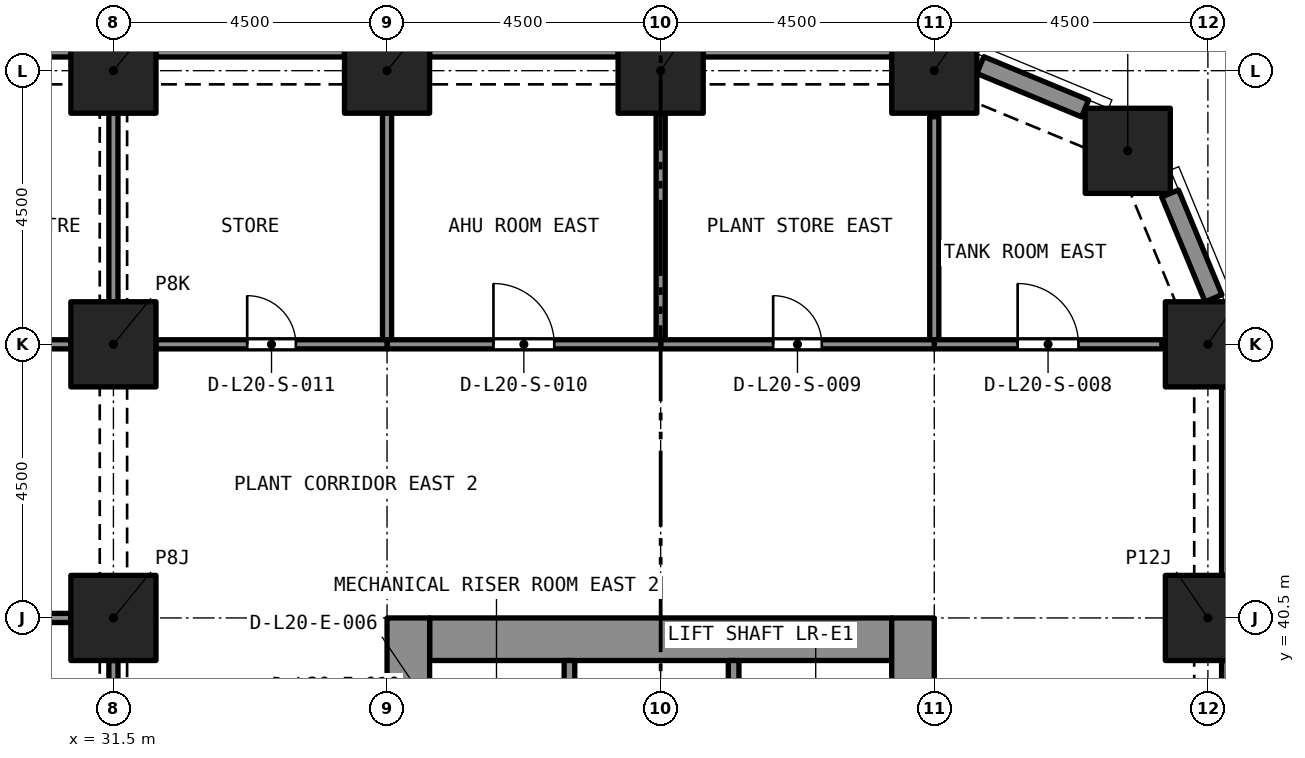
"""IFC4 building model, lengths in metres.
Left out: names, types, materials, properties, quantities, classifications, styles, units other than length and angle.
Written with IfcOpenShell. Run it as: python <this file> out.ifc"""

import sys

from ifc_helpers import new_model, si_unit, direction, frame, frame_2d, origin, origin_2d, place, context, subcontext, project, spatial, rectangle, extrude, element, fill, save


model = new_model("IFC4")
c1 = context("Model", 3, precision=1e-05, world=origin(), true_north=direction((0.0, 1.0)))
c2 = subcontext(c1, "Body", "Model", "MODEL_VIEW")
j1 = project(units=[si_unit("LENGTHUNIT", "METRE"), si_unit("PLANEANGLEUNIT", "RADIAN")], contexts=[c1])
p1 = place(None, origin())
s1 = spatial("IfcSite", under=j1, at=p1, CompositionType="ELEMENT")
p2 = place(p1, origin())
s2 = spatial("IfcBuilding", under=s1, at=p2, CompositionType="ELEMENT")
p3 = place(p2, frame((0.0, 0.0, 75.2)))
s3 = spatial("IfcBuildingStorey", under=s2, at=p3, CompositionType="ELEMENT", Elevation=75.2)
for number, where, z_axis, x_axis in (
    (1, (31.5, 40.5, 0.0), (0.0, 0.0, 1.0), (1.0, 0.0, 0.0)),
    (2, (49.5, 40.5, 0.0), (0.0, 0.0, 1.0), (1.0, 0.0, 0.0)),
    (3, (31.5, 45.0, 0.0), (0.0, 0.0, 1.0), (1.0, 0.0, 0.0)),
    (4, (49.5, 45.0, 0.0), (0.0, 0.0, 1.0), (1.0, 0.0, 0.0)),
    (5, (48.182, 48.182, 0.0), (0.0, 0.0, 1.0), (1.0, 0.0, 0.0)),
    (6, (31.5, 49.5, 0.0), (0.0, 0.0, 1.0), (1.0, 0.0, 0.0)),
    (7, (36.0, 49.5, 0.0), (0.0, 0.0, 1.0), (1.0, 0.0, 0.0)),
    (8, (40.5, 49.5, 0.0), (0.0, 0.0, 1.0), (1.0, 0.0, 0.0)),
    (9, (45.0, 49.5, 0.0), (0.0, 0.0, 1.0), (1.0, 0.0, 0.0)),
):
    element("IfcColumn", number, at=place(p3, frame(where, z_axis=z_axis, x_axis=x_axis)), inside=s3, PredefinedType="COLUMN", context=c2, shape_type="SweptSolid", body=[
        extrude(rectangle(XDim=1.4, YDim=1.4, at=origin_2d()), origin(), (0.0, 0.0, 1.0), 4.8),
    ])
p4 = place(p3, frame((36.7, 40.15, 0.0), z_axis=(0.0, 0.0, 1.0), x_axis=(1.0, 0.0, 0.0)))
e10 = element("IfcWall", 10, at=p4, inside=s3, PredefinedType="SOLIDWALL", context=c2, shape_type="SweptSolid", body=[
    extrude(rectangle(XDim=7.6, YDim=0.7, at=frame_2d((3.8, 0.0))), origin(), (0.0, 0.0, 1.0), 4.8),
])
p5 = place(p3, frame((36.35, 27.0, 0.0), z_axis=(0.0, 0.0, 1.0), x_axis=(0.0, 1.0, 0.0)))
e11 = element("IfcWall", 11, at=p5, inside=s3, PredefinedType="SOLIDWALL", context=c2, shape_type="SweptSolid", body=[
    extrude(rectangle(XDim=13.5, YDim=0.7, at=frame_2d((6.75, 0.0))), origin(), (0.0, 0.0, 1.0), 4.8),
])
p6 = place(p5, frame((8.95, 0.0, 0.0)))
e12 = element("IfcOpeningElement", 12, at=p6, cuts=e11, PredefinedType="OPENING", context=c2, shape_type="SweptSolid", body=[
    extrude(rectangle(XDim=1.2, YDim=2.1, at=frame_2d((0.6, 1.05))), frame((0.0, 0.36, 0.0), z_axis=(0.0, -1.0, 0.0), x_axis=(1.0, 0.0, 0.0)), (0.0, 0.0, 1.0), 0.72),
])
p7 = place(p3, frame((44.65, 27.0, 0.0), z_axis=(0.0, 0.0, 1.0), x_axis=(0.0, 1.0, 0.0)))
e13 = element("IfcWall", 13, at=p7, inside=s3, PredefinedType="SOLIDWALL", context=c2, shape_type="SweptSolid", body=[
    extrude(rectangle(XDim=13.5, YDim=0.7, at=frame_2d((6.75, 0.0))), origin(), (0.0, 0.0, 1.0), 4.8),
])
p8 = place(p7, frame((8.95, 0.0, 0.0)))
e14 = element("IfcOpeningElement", 14, at=p8, cuts=e13, PredefinedType="OPENING", context=c2, shape_type="SweptSolid", body=[
    extrude(rectangle(XDim=1.2, YDim=2.1, at=frame_2d((0.6, 1.05))), frame((0.0, 0.36, 0.0), z_axis=(0.0, -1.0, 0.0), x_axis=(1.0, 0.0, 0.0)), (0.0, 0.0, 1.0), 0.72),
])
for number, where, z_axis, x_axis in (
    (15, (49.875, 39.8, 0.0), (0.0, 0.0, 1.0), (0.0, -1.0, 0.0)),
    (16, (49.875, 44.3, 0.0), (0.0, 0.0, 1.0), (0.0, -1.0, 0.0)),
):
    element("IfcWall", number, at=place(p3, frame(where, z_axis=z_axis, x_axis=x_axis)), inside=s3, PredefinedType="SOLIDWALL", context=c2, shape_type="SweptSolid", body=[
        extrude(rectangle(XDim=3.1, YDim=0.3, at=frame_2d((1.55, 0.0))), origin(), (0.0, 0.0, 1.0), 4.8),
    ])
p9 = place(p3, frame((48.878, 47.48, 0.0), z_axis=(0.0, 0.0, 1.0), x_axis=(0.38262540684, -0.923903565336, 0.0)))
e17 = element("IfcWall", 17, at=p9, inside=s3, PredefinedType="SOLIDWALL", context=c2, shape_type="SweptSolid", body=[
    extrude(rectangle(XDim=1.865, YDim=0.3, at=frame_2d((0.933, 0.0))), origin(), (0.0, 0.0, 1.0), 4.8),
])
p10 = place(p3, frame((45.757, 49.592, 0.0), z_axis=(0.0, 0.0, 1.0), x_axis=(0.923857286003, -0.382737135771, 0.0)))
e18 = element("IfcWall", 18, at=p10, inside=s3, PredefinedType="SOLIDWALL", context=c2, shape_type="SweptSolid", body=[
    extrude(rectangle(XDim=1.865, YDim=0.3, at=frame_2d((0.933, 0.0))), origin(), (0.0, 0.0, 1.0), 4.8),
])
for number, where, z_axis, x_axis in (
    (19, (41.2, 49.875, 0.0), (0.0, 0.0, 1.0), (1.0, 0.0, 0.0)),
    (20, (36.7, 49.875, 0.0), (0.0, 0.0, 1.0), (1.0, 0.0, 0.0)),
    (21, (32.2, 49.875, 0.0), (0.0, 0.0, 1.0), (1.0, 0.0, 0.0)),
    (22, (27.7, 49.875, 0.0), (0.0, 0.0, 1.0), (1.0, 0.0, 0.0)),
):
    element("IfcWall", number, at=place(p3, frame(where, z_axis=z_axis, x_axis=x_axis)), inside=s3, PredefinedType="SOLIDWALL", context=c2, shape_type="SweptSolid", body=[
        extrude(rectangle(XDim=3.1, YDim=0.3, at=frame_2d((1.55, 0.0))), origin(), (0.0, 0.0, 1.0), 4.8),
    ])
for number, where, z_axis, x_axis in (
    (23, (41.7, 37.5, 0.0), (0.0, 0.0, 1.0), (0.0, 1.0, 0.0)),
    (24, (39.0, 37.5, 0.0), (0.0, 0.0, 1.0), (0.0, 1.0, 0.0)),
):
    element("IfcWall", number, at=place(p3, frame(where, z_axis=z_axis, x_axis=x_axis)), inside=s3, PredefinedType="SOLIDWALL", context=c2, shape_type="SweptSolid", body=[
        extrude(rectangle(XDim=2.3, YDim=0.175, at=frame_2d((1.15, 0.0))), origin(), (0.0, 0.0, 1.0), 4.5),
    ])
p11 = place(p3, frame((30.8, 40.5, 0.0), z_axis=(0.0, 0.0, 1.0), x_axis=(-1.0, 0.0, 0.0)))
e25 = element("IfcWall", 25, at=p11, inside=s3, PredefinedType="PARTITIONING", context=c2, shape_type="SweptSolid", body=[
    extrude(rectangle(XDim=12.1, YDim=0.15, at=frame_2d((6.05, 0.0))), origin(), (0.0, 0.0, 1.0), 4.35),
])
p12 = place(p11, frame((5.55, 0.0, 0.0)))
e26 = element("IfcOpeningElement", 26, at=p12, cuts=e25, PredefinedType="OPENING", context=c2, shape_type="SweptSolid", body=[
    extrude(rectangle(XDim=1.0, YDim=2.1, at=frame_2d((0.5, 1.05))), frame((0.0, 0.085, 0.0), z_axis=(0.0, -1.0, 0.0), x_axis=(1.0, 0.0, 0.0)), (0.0, 0.0, 1.0), 0.17),
])
p13 = place(p3, frame((31.5, 36.7, 0.0), z_axis=(0.0, 0.0, 1.0), x_axis=(0.0, 1.0, 0.0)))
e27 = element("IfcWall", 27, at=p13, inside=s3, PredefinedType="PARTITIONING", context=c2, shape_type="SweptSolid", body=[
    extrude(rectangle(XDim=3.1, YDim=0.15, at=frame_2d((1.55, 0.0))), origin(), (0.0, 0.0, 1.0), 3.98),
])
p14 = place(p3, frame((27.0, 45.0, 0.0), z_axis=(0.0, 0.0, 1.0), x_axis=(1.0, 0.0, 0.0)))
e28 = element("IfcWall", 28, at=p14, inside=s3, PredefinedType="PARTITIONING", context=c2, shape_type="SweptSolid", body=[
    extrude(rectangle(XDim=3.8, YDim=0.15, at=frame_2d((1.9, 0.0))), origin(), (0.0, 0.0, 1.0), 4.35),
])
p15 = place(p14, frame((1.15, 0.0, 0.0)))
e29 = element("IfcOpeningElement", 29, at=p15, cuts=e28, PredefinedType="OPENING", context=c2, shape_type="SweptSolid", body=[
    extrude(rectangle(XDim=1.5, YDim=2.4, at=frame_2d((0.75, 1.2))), frame((0.0, 0.085, 0.0), z_axis=(0.0, -1.0, 0.0), x_axis=(1.0, 0.0, 0.0)), (0.0, 0.0, 1.0), 0.17),
])
p16 = place(p3, frame((31.5, 45.7, 0.0), z_axis=(0.0, 0.0, 1.0), x_axis=(0.0, 1.0, 0.0)))
e30 = element("IfcWall", 30, at=p16, inside=s3, PredefinedType="PARTITIONING", context=c2, shape_type="SweptSolid", body=[
    extrude(rectangle(XDim=3.1, YDim=0.15, at=frame_2d((1.55, 0.0))), origin(), (0.0, 0.0, 1.0), 3.98),
])
p17 = place(p3, frame((45.0, 45.075, 0.0), z_axis=(0.0, 0.0, 1.0), x_axis=(0.0, 1.0, 0.0)))
e31 = element("IfcWall", 31, at=p17, inside=s3, PredefinedType="PARTITIONING", context=c2, shape_type="SweptSolid", body=[
    extrude(rectangle(XDim=3.667, YDim=0.15, at=frame_2d((1.834, 0.0))), origin(), (0.0, 0.0, 1.0), 4.5),
])
p18 = place(p3, frame((45.0, 45.0, 0.0), z_axis=(0.0, 0.0, 1.0), x_axis=(1.0, 0.0, 0.0)))
e32 = element("IfcWall", 32, at=p18, inside=s3, PredefinedType="PARTITIONING", context=c2, shape_type="SweptSolid", body=[
    extrude(rectangle(XDim=3.742, YDim=0.15, at=frame_2d((1.871, 0.0))), origin(), (0.0, 0.0, 1.0), 4.5),
])
p19 = place(p18, frame((1.371, 0.0, 0.0)))
e33 = element("IfcOpeningElement", 33, at=p19, cuts=e32, PredefinedType="OPENING", context=c2, shape_type="SweptSolid", body=[
    extrude(rectangle(XDim=1.0, YDim=2.1, at=frame_2d((0.5, 1.05))), frame((0.0, 0.085, 0.0), z_axis=(0.0, -1.0, 0.0), x_axis=(1.0, 0.0, 0.0)), (0.0, 0.0, 1.0), 0.17),
])
p20 = place(p3, frame((40.5, 45.075, 0.0), z_axis=(0.0, 0.0, 1.0), x_axis=(0.0, 1.0, 0.0)))
e34 = element("IfcWall", 34, at=p20, inside=s3, PredefinedType="PARTITIONING", context=c2, shape_type="SweptSolid", body=[
    extrude(rectangle(XDim=3.725, YDim=0.15, at=frame_2d((1.863, 0.0))), origin(), (0.0, 0.0, 1.0), 4.5),
])
p21 = place(p3, frame((40.5, 45.0, 0.0), z_axis=(0.0, 0.0, 1.0), x_axis=(1.0, 0.0, 0.0)))
e35 = element("IfcWall", 35, at=p21, inside=s3, PredefinedType="PARTITIONING", context=c2, shape_type="SweptSolid", body=[
    extrude(rectangle(XDim=4.5, YDim=0.15, at=frame_2d((2.25, 0.0))), origin(), (0.0, 0.0, 1.0), 4.5),
])
p22 = place(p21, frame((1.85, 0.0, 0.0)))
e36 = element("IfcOpeningElement", 36, at=p22, cuts=e35, PredefinedType="OPENING", context=c2, shape_type="SweptSolid", body=[
    extrude(rectangle(XDim=0.8, YDim=2.1, at=frame_2d((0.4, 1.05))), frame((0.0, 0.085, 0.0), z_axis=(0.0, -1.0, 0.0), x_axis=(1.0, 0.0, 0.0)), (0.0, 0.0, 1.0), 0.17),
])
p23 = place(p3, frame((36.0, 45.075, 0.0), z_axis=(0.0, 0.0, 1.0), x_axis=(0.0, 1.0, 0.0)))
e37 = element("IfcWall", 37, at=p23, inside=s3, PredefinedType="PARTITIONING", context=c2, shape_type="SweptSolid", body=[
    extrude(rectangle(XDim=3.725, YDim=0.15, at=frame_2d((1.863, 0.0))), origin(), (0.0, 0.0, 1.0), 4.5),
])
p24 = place(p3, frame((36.0, 45.0, 0.0), z_axis=(0.0, 0.0, 1.0), x_axis=(1.0, 0.0, 0.0)))
e38 = element("IfcWall", 38, at=p24, inside=s3, PredefinedType="PARTITIONING", context=c2, shape_type="SweptSolid", body=[
    extrude(rectangle(XDim=4.5, YDim=0.15, at=frame_2d((2.25, 0.0))), origin(), (0.0, 0.0, 1.0), 4.5),
])
p25 = place(p24, frame((1.75, 0.0, 0.0)))
e39 = element("IfcOpeningElement", 39, at=p25, cuts=e38, PredefinedType="OPENING", context=c2, shape_type="SweptSolid", body=[
    extrude(rectangle(XDim=1.0, YDim=2.1, at=frame_2d((0.5, 1.05))), frame((0.0, 0.085, 0.0), z_axis=(0.0, -1.0, 0.0), x_axis=(1.0, 0.0, 0.0)), (0.0, 0.0, 1.0), 0.17),
])
p26 = place(p3, frame((32.2, 45.0, 0.0), z_axis=(0.0, 0.0, 1.0), x_axis=(1.0, 0.0, 0.0)))
e40 = element("IfcWall", 40, at=p26, inside=s3, PredefinedType="PARTITIONING", context=c2, shape_type="SweptSolid", body=[
    extrude(rectangle(XDim=3.8, YDim=0.15, at=frame_2d((1.9, 0.0))), origin(), (0.0, 0.0, 1.0), 4.5),
])
p27 = place(p26, frame((1.5, 0.0, 0.0)))
e41 = element("IfcOpeningElement", 41, at=p27, cuts=e40, PredefinedType="OPENING", context=c2, shape_type="SweptSolid", body=[
    extrude(rectangle(XDim=0.8, YDim=2.1, at=frame_2d((0.4, 1.05))), frame((0.0, 0.085, 0.0), z_axis=(0.0, -1.0, 0.0), x_axis=(1.0, 0.0, 0.0)), (0.0, 0.0, 1.0), 0.17),
])
p28 = place(p19, origin())
e42 = element("IfcDoor", 42, at=p28, inside=s3, OperationType="SINGLE_SWING_RIGHT", PredefinedType="DOOR", context=c2, shape_type="SweptSolid", body=[
    extrude(rectangle(XDim=1.0, YDim=2.1, at=frame_2d((0.5, 1.05))), frame((0.0, 0.025, 0.0), z_axis=(0.0, -1.0, 0.0), x_axis=(1.0, 0.0, 0.0)), (0.0, 0.0, 1.0), 0.05),
])
fill(e33, e42)
p29 = place(p22, origin())
e43 = element("IfcDoor", 43, at=p29, inside=s3, OperationType="SINGLE_SWING_RIGHT", PredefinedType="DOOR", context=c2, shape_type="SweptSolid", body=[
    extrude(rectangle(XDim=0.8, YDim=2.1, at=frame_2d((0.4, 1.05))), frame((0.0, 0.025, 0.0), z_axis=(0.0, -1.0, 0.0), x_axis=(1.0, 0.0, 0.0)), (0.0, 0.0, 1.0), 0.05),
])
fill(e36, e43)
p30 = place(p25, origin())
e44 = element("IfcDoor", 44, at=p30, inside=s3, OperationType="SINGLE_SWING_RIGHT", PredefinedType="DOOR", context=c2, shape_type="SweptSolid", body=[
    extrude(rectangle(XDim=1.0, YDim=2.1, at=frame_2d((0.5, 1.05))), frame((0.0, 0.025, 0.0), z_axis=(0.0, -1.0, 0.0), x_axis=(1.0, 0.0, 0.0)), (0.0, 0.0, 1.0), 0.05),
])
fill(e39, e44)
p31 = place(p27, origin())
e45 = element("IfcDoor", 45, at=p31, inside=s3, OperationType="SINGLE_SWING_RIGHT", PredefinedType="DOOR", context=c2, shape_type="SweptSolid", body=[
    extrude(rectangle(XDim=0.8, YDim=2.1, at=frame_2d((0.4, 1.05))), frame((0.0, 0.025, 0.0), z_axis=(0.0, -1.0, 0.0), x_axis=(1.0, 0.0, 0.0)), (0.0, 0.0, 1.0), 0.05),
])
fill(e41, e45)
save(model, sys.argv[1])
